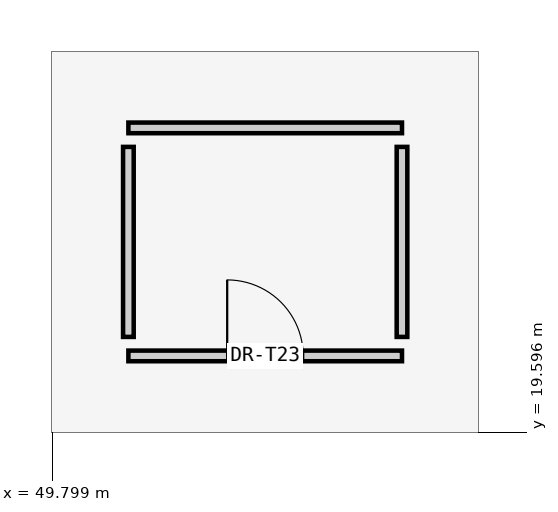
"""IFC4 building model, lengths in metres.
Left out: names, types, materials, properties, quantities, classifications, styles, units other than length and angle.
Written with IfcOpenShell. Run it as: python <this file> out.ifc"""

import sys

from ifc_helpers import new_model, si_unit, direction, frame, frame_2d, origin, place, context, subcontext, project, spatial, rectangle, extrude, element, fill, save


model = new_model("IFC4")
c1 = context("Model", 3, precision=1e-05, world=origin(), true_north=direction((0.0, 1.0)))
c2 = subcontext(c1, "Body", "Model", "MODEL_VIEW")
j1 = project(units=[si_unit("LENGTHUNIT", "METRE"), si_unit("PLANEANGLEUNIT", "RADIAN")], contexts=[c1])
p1 = place(None, origin())
s1 = spatial("IfcSite", under=j1, at=p1, CompositionType="ELEMENT")
p2 = place(p1, origin())
s2 = spatial("IfcBuilding", under=s1, at=p2, CompositionType="ELEMENT")
p3 = place(p2, origin())
s3 = spatial("IfcBuildingStorey", under=s2, at=p3, CompositionType="ELEMENT", Elevation=0.0)
p4 = place(p3, frame((50.8, 20.6, 0.0), z_axis=(0.0, 0.0, 1.0), x_axis=(1.0, 0.0, 0.0)))
e1 = element("IfcWall", 1, at=p4, inside=s3, PredefinedType="PARTITIONING", context=c2, shape_type="SweptSolid", body=[
    extrude(rectangle(XDim=3.6, YDim=0.14, at=frame_2d((1.8, 0.0))), origin(), (0.0, 0.0, 1.0), 4.92),
])
p5 = place(p4, frame((1.3, 0.0, 0.0)))
e2 = element("IfcOpeningElement", 2, at=p5, cuts=e1, PredefinedType="OPENING", context=c2, shape_type="SweptSolid", body=[
    extrude(rectangle(XDim=1.0, YDim=2.15, at=frame_2d((0.5, 1.075))), frame((0.0, 0.08, 0.0), z_axis=(0.0, -1.0, 0.0), x_axis=(1.0, 0.0, 0.0)), (0.0, 0.0, 1.0), 0.16),
])
p6 = place(p3, frame((50.8, 23.6, 0.0), z_axis=(0.0, 0.0, 1.0), x_axis=(1.0, 0.0, 0.0)))
e3 = element("IfcWall", 3, at=p6, inside=s3, PredefinedType="PARTITIONING", context=c2, shape_type="SweptSolid", body=[
    extrude(rectangle(XDim=3.6, YDim=0.14, at=frame_2d((1.8, 0.0))), origin(), (0.0, 0.0, 1.0), 4.92),
])
for number, where, z_axis, x_axis in (
    (4, (50.8, 20.85, 0.0), (0.0, 0.0, 1.0), (0.0, 1.0, 0.0)),
    (5, (54.4, 20.85, 0.0), (0.0, 0.0, 1.0), (0.0, 1.0, 0.0)),
):
    element("IfcWall", number, at=place(p3, frame(where, z_axis=z_axis, x_axis=x_axis)), inside=s3, PredefinedType="PARTITIONING", context=c2, shape_type="SweptSolid", body=[
        extrude(rectangle(XDim=2.5, YDim=0.14, at=frame_2d((1.25, 0.0))), origin(), (0.0, 0.0, 1.0), 4.92),
    ])
p7 = place(p5, origin())
e6 = element("IfcDoor", 6, at=p7, inside=s3, OperationType="SINGLE_SWING_LEFT", PredefinedType="DOOR", context=c2, shape_type="SweptSolid", body=[
    extrude(rectangle(XDim=1.0, YDim=2.15, at=frame_2d((0.5, 1.075))), frame((0.0, 0.025, 0.0), z_axis=(0.0, -1.0, 0.0), x_axis=(1.0, 0.0, 0.0)), (0.0, 0.0, 1.0), 0.05),
])
fill(e2, e6)
save(model, sys.argv[1])
